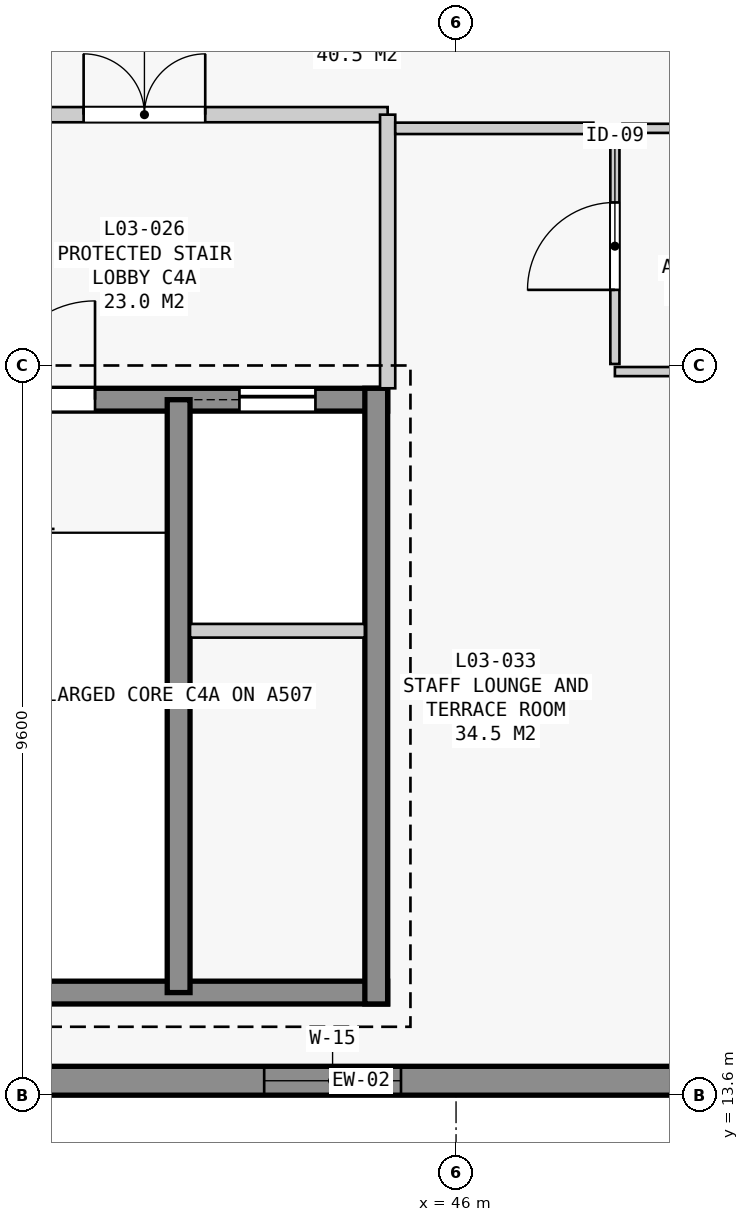
"""IFC4 building model, lengths in metres.
Left out: names, types, materials, properties, quantities, classifications, styles, units other than length and angle.
Written with IfcOpenShell. Run it as: python <this file> out.ifc"""

import sys

from ifc_helpers import new_model, si_unit, direction, frame, frame_2d, origin, place, context, subcontext, project, spatial, rectangle, extrude, element, fill, save


model = new_model("IFC4")
c1 = context("Model", 3, precision=1e-05, world=origin(), true_north=direction((0.0, 1.0)))
c2 = subcontext(c1, "Body", "Model", "MODEL_VIEW")
j1 = project(units=[si_unit("LENGTHUNIT", "METRE"), si_unit("PLANEANGLEUNIT", "RADIAN")], contexts=[c1])
p1 = place(None, origin())
s1 = spatial("IfcSite", under=j1, at=p1, CompositionType="ELEMENT")
p2 = place(p1, origin())
s2 = spatial("IfcBuilding", under=s1, at=p2, CompositionType="ELEMENT")
p3 = place(p2, frame((0.0, 0.0, 13.8)))
s3 = spatial("IfcBuildingStorey", under=s2, at=p3, CompositionType="ELEMENT", Elevation=13.8)
p4 = place(p3, frame((54.11, 13.79, 0.0), z_axis=(0.0, 0.0, 1.0), x_axis=(-1.0, 0.0, 0.0)))
e1 = element("IfcWall", 1, at=p4, inside=s3, PredefinedType="STANDARD", context=c2, shape_type="SweptSolid", body=[
    extrude(rectangle(XDim=18.72, YDim=0.38, at=frame_2d((9.36, 0.0))), origin(), (0.0, 0.0, 1.0), 4.24),
])
p5 = place(p4, frame((8.834, 0.0, 1.05)))
e2 = element("IfcOpeningElement", 2, at=p5, cuts=e1, PredefinedType="OPENING", context=c2, shape_type="SweptSolid", body=[
    extrude(rectangle(XDim=1.8, YDim=2.5, at=frame_2d((0.9, 1.25))), frame((0.0, 0.2, 0.0), z_axis=(0.0, -1.0, 0.0), x_axis=(1.0, 0.0, 0.0)), (0.0, 0.0, 1.0), 0.4),
])
p6 = place(p3, frame((45.1, 14.95, 0.0), z_axis=(0.0, 0.0, 1.0), x_axis=(-1.0, 0.0, 0.0)))
e3 = element("IfcWall", 3, at=p6, inside=s3, PredefinedType="SHEAR", context=c2, shape_type="SweptSolid", body=[
    extrude(rectangle(XDim=6.4, YDim=0.3, at=frame_2d((3.2, 0.0))), origin(), (0.0, 0.0, 1.0), 4.5),
])
p7 = place(p3, frame((38.7, 22.75, 0.0), z_axis=(0.0, 0.0, 1.0), x_axis=(1.0, 0.0, 0.0)))
e4 = element("IfcWall", 4, at=p7, inside=s3, PredefinedType="SHEAR", context=c2, shape_type="SweptSolid", body=[
    extrude(rectangle(XDim=6.4, YDim=0.3, at=frame_2d((3.2, 0.0))), origin(), (0.0, 0.0, 1.0), 4.5),
])
p8 = place(p7, frame((1.25, 0.0, 0.0)))
e5 = element("IfcOpeningElement", 5, at=p8, cuts=e4, PredefinedType="OPENING", context=c2, shape_type="SweptSolid", body=[
    extrude(rectangle(XDim=1.3, YDim=2.2, at=frame_2d((0.65, 1.1))), frame((0.0, 0.16, 0.0), z_axis=(0.0, -1.0, 0.0), x_axis=(1.0, 0.0, 0.0)), (0.0, 0.0, 1.0), 0.32),
])
p9 = place(p7, frame((4.45, 0.0, 0.0)))
e6 = element("IfcOpeningElement", 6, at=p9, cuts=e4, PredefinedType="OPENING", context=c2, shape_type="SweptSolid", body=[
    extrude(rectangle(XDim=1.0, YDim=2.15, at=frame_2d((0.5, 1.075))), frame((0.0, 0.16, 0.0), z_axis=(0.0, -1.0, 0.0), x_axis=(1.0, 0.0, 0.0)), (0.0, 0.0, 1.0), 0.32),
])
p10 = place(p3, frame((44.95, 22.9, 0.0), z_axis=(0.0, 0.0, 1.0), x_axis=(0.0, -1.0, 0.0)))
e7 = element("IfcWall", 7, at=p10, inside=s3, PredefinedType="SHEAR", context=c2, shape_type="SweptSolid", body=[
    extrude(rectangle(XDim=8.1, YDim=0.3, at=frame_2d((4.05, 0.0))), origin(), (0.0, 0.0, 1.0), 4.5),
])
p11 = place(p3, frame((42.35, 14.95, 0.0), z_axis=(0.0, 0.0, 1.0), x_axis=(0.0, 1.0, 0.0)))
e8 = element("IfcWall", 8, at=p11, inside=s3, PredefinedType="SHEAR", context=c2, shape_type="SweptSolid", body=[
    extrude(rectangle(XDim=7.8, YDim=0.3, at=frame_2d((3.9, 0.0))), origin(), (0.0, 0.0, 1.0), 4.5),
])
p12 = place(p3, frame((42.5, 19.71, 0.0), z_axis=(0.0, 0.0, 1.0), x_axis=(1.0, 0.0, 0.0)))
e9 = element("IfcWall", 9, at=p12, inside=s3, PredefinedType="PARTITIONING", context=c2, shape_type="SweptSolid", body=[
    extrude(rectangle(XDim=2.3, YDim=0.18, at=frame_2d((1.15, 0.0))), origin(), (0.0, 0.0, 1.0), 4.5),
])
p13 = place(p3, frame((38.7, 26.5, 0.0), z_axis=(0.0, 0.0, 1.0), x_axis=(1.0, 0.0, 0.0)))
e10 = element("IfcWall", 10, at=p13, inside=s3, PredefinedType="STANDARD", context=c2, shape_type="SweptSolid", body=[
    extrude(rectangle(XDim=6.4, YDim=0.2, at=frame_2d((3.2, 0.0))), origin(), (0.0, 0.0, 1.0), 3.77),
])
p14 = place(p13, frame((2.4, 0.0, 0.0)))
e11 = element("IfcOpeningElement", 11, at=p14, cuts=e10, PredefinedType="OPENING", context=c2, shape_type="SweptSolid", body=[
    extrude(rectangle(XDim=1.6, YDim=2.2, at=frame_2d((0.8, 1.1))), frame((0.0, 0.11, 0.0), z_axis=(0.0, -1.0, 0.0), x_axis=(1.0, 0.0, 0.0)), (0.0, 0.0, 1.0), 0.22),
])
p15 = place(p3, frame((45.1, 26.5, 0.0), z_axis=(0.0, 0.0, 1.0), x_axis=(0.0, -1.0, 0.0)))
e12 = element("IfcWall", 12, at=p15, inside=s3, PredefinedType="STANDARD", context=c2, shape_type="SweptSolid", body=[
    extrude(rectangle(XDim=3.6, YDim=0.2, at=frame_2d((1.8, 0.0))), origin(), (0.0, 0.0, 1.0), 3.52),
])
p16 = place(p3, frame((51.69, 23.12, 0.0), z_axis=(0.0, 0.0, 1.0), x_axis=(-1.0, 0.0, 0.0)))
e13 = element("IfcWall", 13, at=p16, inside=s3, PredefinedType="PARTITIONING", context=c2, shape_type="SweptSolid", body=[
    extrude(rectangle(XDim=3.6, YDim=0.12, at=frame_2d((1.8, 0.0))), origin(), (0.0, 0.0, 1.0), 3.52),
])
p17 = place(p3, frame((48.09, 23.22, 0.0), z_axis=(0.0, 0.0, 1.0), x_axis=(0.0, 1.0, 0.0)))
e14 = element("IfcWall", 14, at=p17, inside=s3, PredefinedType="PARTITIONING", context=c2, shape_type="SweptSolid", body=[
    extrude(rectangle(XDim=3.1, YDim=0.12, at=frame_2d((1.55, 0.0))), origin(), (0.0, 0.0, 1.0), 3.52),
])
p18 = place(p17, frame((0.975, 0.0, 0.0)))
e15 = element("IfcOpeningElement", 15, at=p18, cuts=e14, PredefinedType="OPENING", context=c2, shape_type="SweptSolid", body=[
    extrude(rectangle(XDim=1.15, YDim=2.2, at=frame_2d((0.575, 1.1))), frame((0.0, 0.07, 0.0), z_axis=(0.0, -1.0, 0.0), x_axis=(1.0, 0.0, 0.0)), (0.0, 0.0, 1.0), 0.14),
])
p19 = place(p3, frame((48.19, 26.32, 0.0), z_axis=(0.0, 0.0, 1.0), x_axis=(1.0, 0.0, 0.0)))
e16 = element("IfcWall", 16, at=p19, inside=s3, PredefinedType="PARTITIONING", context=c2, shape_type="SweptSolid", body=[
    extrude(rectangle(XDim=3.5, YDim=0.12, at=frame_2d((1.75, 0.0))), origin(), (0.0, 0.0, 1.0), 4.24),
])
p20 = place(p19, frame((1.275, 0.0, 0.0)))
e17 = element("IfcOpeningElement", 17, at=p20, cuts=e16, PredefinedType="OPENING", context=c2, shape_type="SweptSolid", body=[
    extrude(rectangle(XDim=0.95, YDim=2.15, at=frame_2d((0.475, 1.075))), frame((0.0, 0.07, 0.0), z_axis=(0.0, -1.0, 0.0), x_axis=(1.0, 0.0, 0.0)), (0.0, 0.0, 1.0), 0.14),
])
p21 = place(p3, frame((45.2, 26.32, 0.0), z_axis=(0.0, 0.0, 1.0), x_axis=(1.0, 0.0, 0.0)))
e18 = element("IfcWall", 18, at=p21, inside=s3, PredefinedType="PARTITIONING", context=c2, shape_type="SweptSolid", body=[
    extrude(rectangle(XDim=2.607, YDim=0.15, at=frame_2d((1.303, 0.0))), origin(), (0.0, 0.0, 1.0), 4.24),
])
p22 = place(p5, origin())
e19 = element("IfcWindow", 19, at=p22, inside=s3, PartitioningType="SINGLE_PANEL", PredefinedType="WINDOW", context=c2, shape_type="SweptSolid", body=[
    extrude(rectangle(XDim=1.8, YDim=2.5, at=frame_2d((0.9, 1.25))), frame((0.0, 0.03, 0.0), z_axis=(0.0, -1.0, 0.0), x_axis=(1.0, 0.0, 0.0)), (0.0, 0.0, 1.0), 0.06),
])
fill(e2, e19)
p23 = place(p8, origin())
e20 = element("IfcDoor", 20, at=p23, inside=s3, OperationType="SINGLE_SWING_RIGHT", PredefinedType="DOOR", context=c2, shape_type="SweptSolid", body=[
    extrude(rectangle(XDim=1.3, YDim=2.2, at=frame_2d((0.65, 1.1))), frame((0.0, 0.025, 0.0), z_axis=(0.0, -1.0, 0.0), x_axis=(1.0, 0.0, 0.0)), (0.0, 0.0, 1.0), 0.05),
])
fill(e5, e20)
p24 = place(p9, origin())
e21 = element("IfcDoor", 21, at=p24, inside=s3, OperationType="SLIDING_TO_LEFT", PredefinedType="DOOR", context=c2, shape_type="SweptSolid", body=[
    extrude(rectangle(XDim=1.0, YDim=2.15, at=frame_2d((0.5, 1.075))), frame((0.0, 0.025, 0.0), z_axis=(0.0, -1.0, 0.0), x_axis=(1.0, 0.0, 0.0)), (0.0, 0.0, 1.0), 0.05),
])
fill(e6, e21)
p25 = place(p14, origin())
e22 = element("IfcDoor", 22, at=p25, inside=s3, OperationType="DOUBLE_DOOR_SINGLE_SWING", PredefinedType="DOOR", context=c2, shape_type="SweptSolid", body=[
    extrude(rectangle(XDim=1.6, YDim=2.2, at=frame_2d((0.8, 1.1))), frame((0.0, 0.025, 0.0), z_axis=(0.0, -1.0, 0.0), x_axis=(1.0, 0.0, 0.0)), (0.0, 0.0, 1.0), 0.05),
])
fill(e11, e22)
p26 = place(p18, origin())
e23 = element("IfcDoor", 23, at=p26, inside=s3, OperationType="SINGLE_SWING_LEFT", PredefinedType="DOOR", context=c2, shape_type="SweptSolid", body=[
    extrude(rectangle(XDim=1.15, YDim=2.2, at=frame_2d((0.575, 1.1))), frame((0.0, 0.025, 0.0), z_axis=(0.0, -1.0, 0.0), x_axis=(1.0, 0.0, 0.0)), (0.0, 0.0, 1.0), 0.05),
])
fill(e15, e23)
save(model, sys.argv[1])
